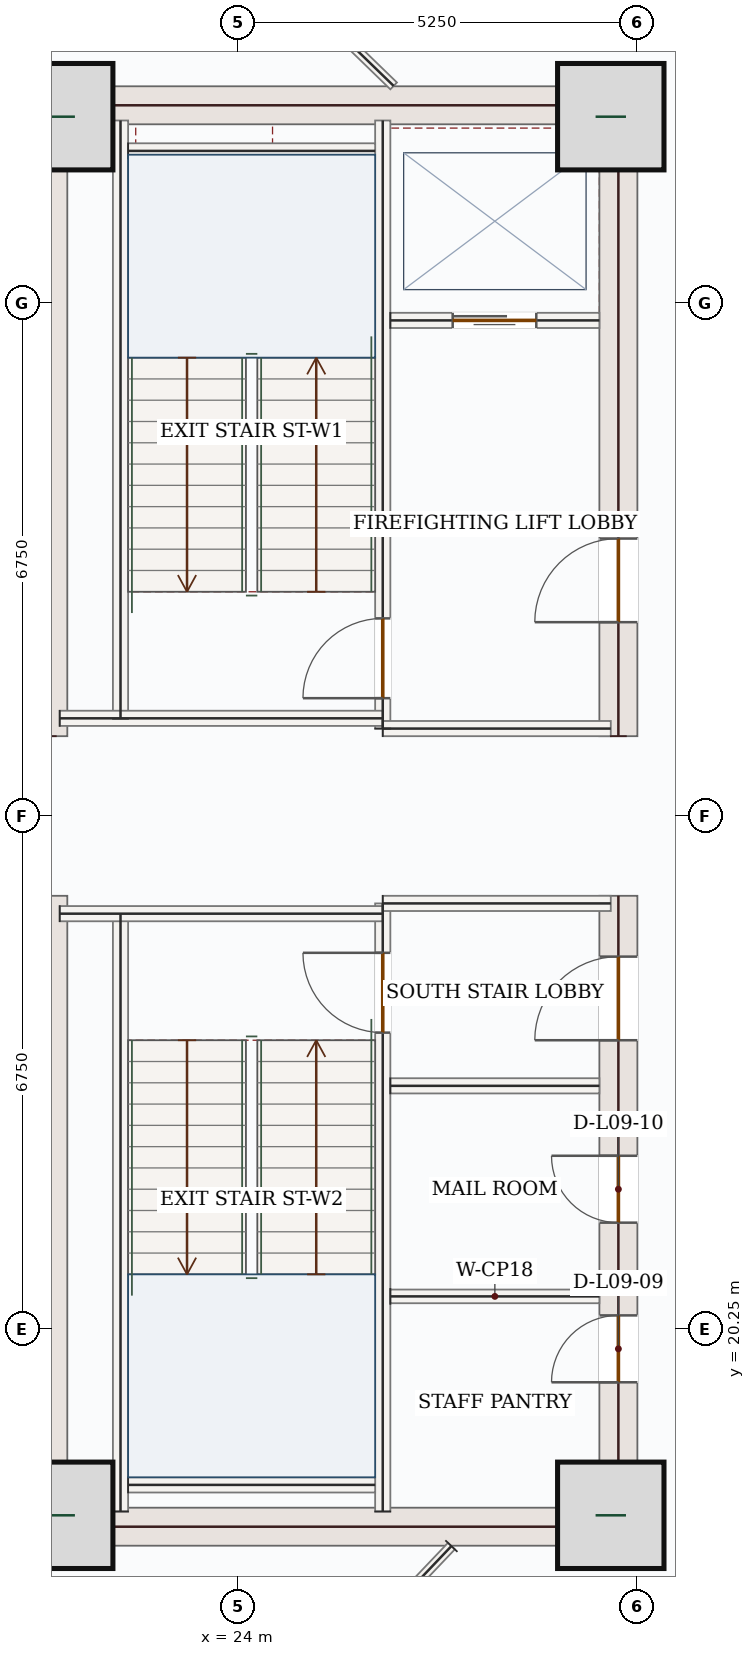
"""IFC4 building model, lengths in metres.
Left out: names, types, materials, properties, quantities, classifications, styles, units other than length and angle.
Written with IfcOpenShell. Run it as: python <this file> out.ifc"""

import sys

from ifc_helpers import new_model, si_unit, direction, frame, frame_2d, origin, origin_2d, place, context, subcontext, project, spatial, rectangle, extrude, source, transform, mapped, element, fill, save


model = new_model("IFC4")
c1 = context("Model", 3, precision=1e-05, world=origin(), true_north=direction((0.0, 1.0)))
c2 = subcontext(c1, "Body", "Model", "MODEL_VIEW")
j1 = project(units=[si_unit("LENGTHUNIT", "METRE"), si_unit("PLANEANGLEUNIT", "RADIAN")], contexts=[c1])
p1 = place(None, origin())
s1 = spatial("IfcSite", under=j1, at=p1, CompositionType="ELEMENT")
p2 = place(p1, origin())
s2 = spatial("IfcBuilding", under=s1, at=p2, CompositionType="ELEMENT")
p3 = place(p2, frame((0.0, 0.0, 45.9)))
s3 = spatial("IfcBuildingStorey", under=s2, at=p3, CompositionType="ELEMENT", Elevation=45.9)
m1 = source(origin(), c2, "Body", "SweptSolid", [
    extrude(rectangle(XDim=8.55, YDim=0.5, at=frame_2d((4.275, 0.0))), origin(), (0.0, 0.0, 1.0), 3.95),
])
for number, where, z_axis, x_axis in (
    (1, (21.5, 17.4, 0.0), (0.0, 0.0, 1.0), (0.0, 1.0, 0.0)),
    (2, (21.5, 28.05, 0.0), (0.0, 0.0, 1.0), (0.0, 1.0, 0.0)),
):
    element("IfcWall", number, at=place(p3, frame(where, z_axis=z_axis, x_axis=x_axis)), inside=s3, PredefinedType="SHEAR", context=c2, shape_type="MappedRepresentation", body=[
        mapped(m1, transform((0.0, 0.0, 0.0), x_axis=(1.0, 0.0, 0.0), y_axis=(0.0, 1.0, 0.0), z_axis=(0.0, 0.0, 1.0), scale=1.0)),
    ])
p4 = place(p3, frame((29.0, 17.4, 0.0), z_axis=(0.0, 0.0, 1.0), x_axis=(0.0, 1.0, 0.0)))
e3 = element("IfcWall", 3, at=p4, inside=s3, PredefinedType="SHEAR", context=c2, shape_type="SweptSolid", body=[
    extrude(rectangle(XDim=8.55, YDim=0.5, at=frame_2d((4.275, 0.0))), origin(), (0.0, 0.0, 1.0), 3.95),
])
p5 = place(p4, frame((6.65, 0.0, 0.0)))
e4 = element("IfcOpeningElement", 4, at=p5, cuts=e3, PredefinedType="OPENING", context=c2, shape_type="SweptSolid", body=[
    extrude(rectangle(XDim=1.1, YDim=2.2, at=frame_2d((0.55, 1.1))), frame((0.0, 0.26, 0.0), z_axis=(0.0, -1.0, 0.0), x_axis=(1.0, 0.0, 0.0)), (0.0, 0.0, 1.0), 0.52),
])
p6 = place(p4, frame((2.15, 0.0, 0.0)))
e5 = element("IfcOpeningElement", 5, at=p6, cuts=e3, PredefinedType="OPENING", context=c2, shape_type="SweptSolid", body=[
    extrude(rectangle(XDim=0.88, YDim=2.1, at=frame_2d((0.44, 1.05))), frame((0.0, 0.26, 0.0), z_axis=(0.0, -1.0, 0.0), x_axis=(1.0, 0.0, 0.0)), (0.0, 0.0, 1.0), 0.52),
])
p7 = place(p4, frame((4.25, 0.0, 0.0)))
e6 = element("IfcOpeningElement", 6, at=p7, cuts=e3, PredefinedType="OPENING", context=c2, shape_type="SweptSolid", body=[
    extrude(rectangle(XDim=0.88, YDim=2.1, at=frame_2d((0.44, 1.05))), frame((0.0, 0.26, 0.0), z_axis=(0.0, -1.0, 0.0), x_axis=(1.0, 0.0, 0.0)), (0.0, 0.0, 1.0), 0.52),
])
p8 = place(p3, frame((29.0, 28.05, 0.0), z_axis=(0.0, 0.0, 1.0), x_axis=(0.0, 1.0, 0.0)))
e7 = element("IfcWall", 7, at=p8, inside=s3, PredefinedType="SHEAR", context=c2, shape_type="SweptSolid", body=[
    extrude(rectangle(XDim=8.55, YDim=0.5, at=frame_2d((4.275, 0.0))), origin(), (0.0, 0.0, 1.0), 3.95),
])
p9 = place(p8, frame((1.5, 0.0, 0.0)))
e8 = element("IfcOpeningElement", 8, at=p9, cuts=e7, PredefinedType="OPENING", context=c2, shape_type="SweptSolid", body=[
    extrude(rectangle(XDim=1.1, YDim=2.2, at=frame_2d((0.55, 1.1))), frame((0.0, 0.26, 0.0), z_axis=(0.0, -1.0, 0.0), x_axis=(1.0, 0.0, 0.0)), (0.0, 0.0, 1.0), 0.52),
])
m2 = source(origin(), c2, "Body", "SweptSolid", [
    extrude(rectangle(XDim=7.0, YDim=0.5, at=frame_2d((3.5, 0.0))), origin(), (0.0, 0.0, 1.0), 3.95),
])
for number, where, z_axis, x_axis in (
    (9, (21.75, 17.65, 0.0), (0.0, 0.0, 1.0), (1.0, 0.0, 0.0)),
    (10, (21.75, 36.35, 0.0), (0.0, 0.0, 1.0), (1.0, 0.0, 0.0)),
):
    element("IfcWall", number, at=place(p3, frame(where, z_axis=z_axis, x_axis=x_axis)), inside=s3, PredefinedType="SHEAR", context=c2, shape_type="MappedRepresentation", body=[
        mapped(m2, transform((0.0, 0.0, 0.0), x_axis=(1.0, 0.0, 0.0), y_axis=(0.0, 1.0, 0.0), z_axis=(0.0, 0.0, 1.0), scale=1.0)),
    ])
m3 = source(origin(), c2, "Body", "SweptSolid", [
    extrude(rectangle(XDim=1.4, YDim=1.4, at=origin_2d()), origin(), (0.0, 0.0, 1.0), 4.2),
])
for number, where, z_axis, x_axis in (
    (11, (21.65, 17.8, 0.0), (0.0, 0.0, 1.0), (1.0, 0.0, 0.0)),
    (12, (28.9, 17.8, 0.0), (0.0, 0.0, 1.0), (1.0, 0.0, 0.0)),
    (13, (21.65, 36.2, 0.0), (0.0, 0.0, 1.0), (1.0, 0.0, 0.0)),
    (14, (28.9, 36.2, 0.0), (0.0, 0.0, 1.0), (1.0, 0.0, 0.0)),
):
    element("IfcColumn", number, at=place(p3, frame(where, z_axis=z_axis, x_axis=x_axis)), inside=s3, PredefinedType="COLUMN", context=c2, shape_type="MappedRepresentation", body=[
        mapped(m3, transform((0.0, 0.0, 0.0), x_axis=(1.0, 0.0, 0.0), y_axis=(0.0, 1.0, 0.0), z_axis=(0.0, 0.0, 1.0), scale=1.0)),
    ])
p10 = place(p3, frame((22.658, 14.74, 0.0), z_axis=(0.0, 0.0, 1.0), x_axis=(-0.707106781187, 0.707106781187, 0.0)))
e15 = element("IfcWall", 15, at=p10, inside=s3, PredefinedType="SOLIDWALL", context=c2, shape_type="SweptSolid", body=[
    extrude(rectangle(XDim=5.258, YDim=0.32, at=frame_2d((2.629, 0.0))), origin(), (0.0, 0.0, 1.0), 3.95),
])
p11 = place(p10, frame((1.429, 0.0, 0.85)))
e16 = element("IfcOpeningElement", 16, at=p11, cuts=e15, PredefinedType="OPENING", context=c2, shape_type="SweptSolid", body=[
    extrude(rectangle(XDim=2.4, YDim=1.8, at=frame_2d((1.2, 0.9))), frame((0.0, 0.17, 0.0), z_axis=(0.0, -1.0, 0.0), x_axis=(1.0, 0.0, 0.0)), (0.0, 0.0, 1.0), 0.34),
])
m4 = source(origin(), c2, "Body", "SweptSolid", [
    extrude(rectangle(XDim=5.258, YDim=0.32, at=frame_2d((2.629, 0.0))), origin(), (0.0, 0.0, 1.0), 3.95),
])
p12 = place(p3, frame((18.94, 35.542, 0.0), z_axis=(0.0, 0.0, 1.0), x_axis=(0.707106781187, 0.707106781187, 0.0)))
e17 = element("IfcWall", 17, at=p12, inside=s3, PredefinedType="SOLIDWALL", context=c2, shape_type="MappedRepresentation", body=[
    mapped(m4, transform((0.0, 0.0, 0.0), x_axis=(1.0, 0.0, 0.0), y_axis=(0.0, 1.0, 0.0), z_axis=(0.0, 0.0, 1.0), scale=1.0)),
])
m5 = source(origin(), c2, "Body", "SweptSolid", [
    extrude(rectangle(XDim=7.87, YDim=0.2, at=frame_2d((3.935, 0.0))), origin(), (0.0, 0.0, 1.0), 3.95),
])
for number, where, z_axis, x_axis in (
    (18, (22.45, 17.85, 0.0), (0.0, 0.0, 1.0), (0.0, 1.0, 0.0)),
    (19, (22.45, 28.28, 0.0), (0.0, 0.0, 1.0), (0.0, 1.0, 0.0)),
):
    element("IfcWall", number, at=place(p3, frame(where, z_axis=z_axis, x_axis=x_axis)), inside=s3, PredefinedType="SOLIDWALL", context=c2, shape_type="MappedRepresentation", body=[
        mapped(m5, transform((0.0, 0.0, 0.0), x_axis=(1.0, 0.0, 0.0), y_axis=(0.0, 1.0, 0.0), z_axis=(0.0, 0.0, 1.0), scale=1.0)),
    ])
p13 = place(p3, frame((25.9, 17.85, 0.0), z_axis=(0.0, 0.0, 1.0), x_axis=(0.0, 1.0, 0.0)))
e20 = element("IfcWall", 20, at=p13, inside=s3, PredefinedType="SOLIDWALL", context=c2, shape_type="SweptSolid", body=[
    extrude(rectangle(XDim=8.0, YDim=0.2, at=frame_2d((4.0, 0.0))), origin(), (0.0, 0.0, 1.0), 3.95),
])
p14 = place(p13, frame((6.3, 0.0, 0.0)))
e21 = element("IfcOpeningElement", 21, at=p14, cuts=e20, PredefinedType="OPENING", context=c2, shape_type="SweptSolid", body=[
    extrude(rectangle(XDim=1.05, YDim=2.15, at=frame_2d((0.525, 1.075))), frame((0.0, 0.11, 0.0), z_axis=(0.0, -1.0, 0.0), x_axis=(1.0, 0.0, 0.0)), (0.0, 0.0, 1.0), 0.22),
])
p15 = place(p3, frame((25.9, 28.15, 0.0), z_axis=(0.0, 0.0, 1.0), x_axis=(0.0, 1.0, 0.0)))
e22 = element("IfcWall", 22, at=p15, inside=s3, PredefinedType="SOLIDWALL", context=c2, shape_type="SweptSolid", body=[
    extrude(rectangle(XDim=8.0, YDim=0.2, at=frame_2d((4.0, 0.0))), origin(), (0.0, 0.0, 1.0), 3.95),
])
p16 = place(p15, frame((0.4, 0.0, 0.0)))
e23 = element("IfcOpeningElement", 23, at=p16, cuts=e22, PredefinedType="OPENING", context=c2, shape_type="SweptSolid", body=[
    extrude(rectangle(XDim=1.05, YDim=2.15, at=frame_2d((0.525, 1.075))), frame((0.0, 0.11, 0.0), z_axis=(0.0, -1.0, 0.0), x_axis=(1.0, 0.0, 0.0)), (0.0, 0.0, 1.0), 0.22),
])
m6 = source(origin(), c2, "Body", "SweptSolid", [
    extrude(rectangle(XDim=4.25, YDim=0.2, at=frame_2d((2.125, 0.0))), origin(), (0.0, 0.0, 1.0), 3.95),
])
p17 = place(p3, frame((21.65, 25.715, 0.0), z_axis=(0.0, 0.0, 1.0), x_axis=(1.0, 0.0, 0.0)))
e24 = element("IfcWall", 24, at=p17, inside=s3, PredefinedType="SOLIDWALL", context=c2, shape_type="MappedRepresentation", body=[
    mapped(m6, transform((0.0, 0.0, 0.0), x_axis=(1.0, 0.0, 0.0), y_axis=(0.0, 1.0, 0.0), z_axis=(0.0, 0.0, 1.0), scale=1.0)),
])
m7 = source(origin(), c2, "Body", "SweptSolid", [
    extrude(rectangle(XDim=3.0, YDim=0.2, at=frame_2d((1.5, 0.0))), origin(), (0.0, 0.0, 1.0), 3.95),
])
p18 = place(p3, frame((25.9, 25.85, 0.0), z_axis=(0.0, 0.0, 1.0), x_axis=(1.0, 0.0, 0.0)))
e25 = element("IfcWall", 25, at=p18, inside=s3, PredefinedType="SOLIDWALL", context=c2, shape_type="MappedRepresentation", body=[
    mapped(m7, transform((0.0, 0.0, 0.0), x_axis=(1.0, 0.0, 0.0), y_axis=(0.0, 1.0, 0.0), z_axis=(0.0, 0.0, 1.0), scale=1.0)),
])
p19 = place(p3, frame((21.65, 28.285, 0.0), z_axis=(0.0, 0.0, 1.0), x_axis=(1.0, 0.0, 0.0)))
e26 = element("IfcWall", 26, at=p19, inside=s3, PredefinedType="SOLIDWALL", context=c2, shape_type="MappedRepresentation", body=[
    mapped(m6, transform((0.0, 0.0, 0.0), x_axis=(1.0, 0.0, 0.0), y_axis=(0.0, 1.0, 0.0), z_axis=(0.0, 0.0, 1.0), scale=1.0)),
])
p20 = place(p3, frame((25.9, 28.15, 0.0), z_axis=(0.0, 0.0, 1.0), x_axis=(1.0, 0.0, 0.0)))
e27 = element("IfcWall", 27, at=p20, inside=s3, PredefinedType="SOLIDWALL", context=c2, shape_type="MappedRepresentation", body=[
    mapped(m7, transform((0.0, 0.0, 0.0), x_axis=(1.0, 0.0, 0.0), y_axis=(0.0, 1.0, 0.0), z_axis=(0.0, 0.0, 1.0), scale=1.0)),
])
m8 = source(origin(), c2, "Body", "SweptSolid", [
    extrude(rectangle(XDim=3.25, YDim=0.2, at=frame_2d((1.625, 0.0))), origin(), (0.0, 0.0, 1.0), 3.95),
])
for number, where, z_axis, x_axis in (
    (28, (22.55, 35.75, 0.0), (0.0, 0.0, 1.0), (1.0, 0.0, 0.0)),
    (29, (22.55, 18.2, 0.0), (0.0, 0.0, 1.0), (1.0, 0.0, 0.0)),
):
    element("IfcWall", number, at=place(p3, frame(where, z_axis=z_axis, x_axis=x_axis)), inside=s3, PredefinedType="SOLIDWALL", context=c2, shape_type="MappedRepresentation", body=[
        mapped(m8, transform((0.0, 0.0, 0.0), x_axis=(1.0, 0.0, 0.0), y_axis=(0.0, 1.0, 0.0), z_axis=(0.0, 0.0, 1.0), scale=1.0)),
    ])
p21 = place(p3, frame((26.0, 33.52, 0.0), z_axis=(0.0, 0.0, 1.0), x_axis=(1.0, 0.0, 0.0)))
e30 = element("IfcWall", 30, at=p21, inside=s3, PredefinedType="SOLIDWALL", context=c2, shape_type="SweptSolid", body=[
    extrude(rectangle(XDim=2.75, YDim=0.2, at=frame_2d((1.375, 0.0))), origin(), (0.0, 0.0, 1.0), 3.95),
])
p22 = place(p21, frame((0.82, 0.0, 0.0)))
e31 = element("IfcOpeningElement", 31, at=p22, cuts=e30, PredefinedType="OPENING", context=c2, shape_type="SweptSolid", body=[
    extrude(rectangle(XDim=1.1, YDim=2.15, at=frame_2d((0.55, 1.075))), frame((0.0, 0.11, 0.0), z_axis=(0.0, -1.0, 0.0), x_axis=(1.0, 0.0, 0.0)), (0.0, 0.0, 1.0), 0.22),
])
m9 = source(origin(), c2, "Body", "SweptSolid", [
    extrude(rectangle(XDim=2.75, YDim=0.2, at=frame_2d((1.375, 0.0))), origin(), (0.0, 0.0, 1.0), 3.95),
])
p23 = place(p3, frame((26.0, 23.45, 0.0), z_axis=(0.0, 0.0, 1.0), x_axis=(1.0, 0.0, 0.0)))
e32 = element("IfcWall", 32, at=p23, inside=s3, PredefinedType="SOLIDWALL", context=c2, shape_type="MappedRepresentation", body=[
    mapped(m9, transform((0.0, 0.0, 0.0), x_axis=(1.0, 0.0, 0.0), y_axis=(0.0, 1.0, 0.0), z_axis=(0.0, 0.0, 1.0), scale=1.0)),
])
m10 = source(origin(), c2, "Body", "SweptSolid", [
    extrude(rectangle(XDim=2.75, YDim=0.18, at=frame_2d((1.375, 0.0))), origin(), (0.0, 0.0, 1.0), 3.95),
])
p24 = place(p3, frame((26.0, 20.68, 0.0), z_axis=(0.0, 0.0, 1.0), x_axis=(1.0, 0.0, 0.0)))
e33 = element("IfcWall", 33, at=p24, inside=s3, PredefinedType="PARTITIONING", context=c2, shape_type="MappedRepresentation", body=[
    mapped(m10, transform((0.0, 0.0, 0.0), x_axis=(1.0, 0.0, 0.0), y_axis=(0.0, 1.0, 0.0), z_axis=(0.0, 0.0, 1.0), scale=1.0)),
])
m11 = source(origin(), c2, "Body", "SweptSolid", [
    extrude(rectangle(XDim=1.771, YDim=0.125, at=frame_2d((0.885, 0.0))), origin(), (0.0, 0.0, 1.0), 3.95),
])
p25 = place(p3, frame((24.772, 37.838, 0.0), z_axis=(0.0, 0.0, 1.0), x_axis=(0.717777212316, -0.696272844135, 0.0)))
e34 = element("IfcWall", 34, at=p25, inside=s3, PredefinedType="PARTITIONING", context=c2, shape_type="MappedRepresentation", body=[
    mapped(m11, transform((0.0, 0.0, 0.0), x_axis=(1.0, 0.0, 0.0), y_axis=(0.0, 1.0, 0.0), z_axis=(0.0, 0.0, 1.0), scale=1.0)),
])
m12 = source(origin(), c2, "Body", "SweptSolid", [
    extrude(rectangle(XDim=3.438, YDim=0.125, at=frame_2d((1.719, 0.0))), origin(), (0.0, 0.0, 1.0), 3.95),
])
p26 = place(p3, frame((26.803, 17.395, 0.0), z_axis=(0.0, 0.0, 1.0), x_axis=(-0.689493786127, -0.724291597972, 0.0)))
e35 = element("IfcWall", 35, at=p26, inside=s3, PredefinedType="PARTITIONING", context=c2, shape_type="MappedRepresentation", body=[
    mapped(m12, transform((0.0, 0.0, 0.0), x_axis=(1.0, 0.0, 0.0), y_axis=(0.0, 1.0, 0.0), z_axis=(0.0, 0.0, 1.0), scale=1.0)),
])
m13 = source(origin(), c2, "Body", "SweptSolid", [
    extrude(rectangle(XDim=2.4, YDim=1.8, at=frame_2d((1.2, 0.9))), frame((0.0, 0.03, 0.0), z_axis=(0.0, -1.0, 0.0), x_axis=(1.0, 0.0, 0.0)), (0.0, 0.0, 1.0), 0.06),
])
p27 = place(p11, origin())
e36 = element("IfcWindow", 36, at=p27, inside=s3, PartitioningType="DOUBLE_PANEL_VERTICAL", PredefinedType="WINDOW", context=c2, shape_type="MappedRepresentation", body=[
    mapped(m13, transform((0.0, 0.0, 0.0), x_axis=(1.0, 0.0, 0.0), y_axis=(0.0, 1.0, 0.0), z_axis=(0.0, 0.0, 1.0), scale=1.0)),
])
fill(e16, e36)
m14 = source(origin(), c2, "Body", "SweptSolid", [
    extrude(rectangle(XDim=1.05, YDim=2.15, at=frame_2d((0.525, 1.075))), frame((0.0, 0.025, 0.0), z_axis=(0.0, -1.0, 0.0), x_axis=(1.0, 0.0, 0.0)), (0.0, 0.0, 1.0), 0.05),
])
p28 = place(p16, origin())
e37 = element("IfcDoor", 37, at=p28, inside=s3, OperationType="SINGLE_SWING_LEFT", PredefinedType="DOOR", context=c2, shape_type="MappedRepresentation", body=[
    mapped(m14, transform((0.0, 0.0, 0.0), x_axis=(1.0, 0.0, 0.0), y_axis=(0.0, 1.0, 0.0), z_axis=(0.0, 0.0, 1.0), scale=1.0)),
])
fill(e23, e37)
p29 = place(p14, origin())
e38 = element("IfcDoor", 38, at=p29, inside=s3, OperationType="SINGLE_SWING_RIGHT", PredefinedType="DOOR", context=c2, shape_type="MappedRepresentation", body=[
    mapped(m14, transform((0.0, 0.0, 0.0), x_axis=(1.0, 0.0, 0.0), y_axis=(0.0, 1.0, 0.0), z_axis=(0.0, 0.0, 1.0), scale=1.0)),
])
fill(e21, e38)
m15 = source(origin(), c2, "Body", "SweptSolid", [
    extrude(rectangle(XDim=1.1, YDim=2.15, at=frame_2d((0.55, 1.075))), frame((0.0, 0.025, 0.0), z_axis=(0.0, -1.0, 0.0), x_axis=(1.0, 0.0, 0.0)), (0.0, 0.0, 1.0), 0.05),
])
p30 = place(p22, origin())
e39 = element("IfcDoor", 39, at=p30, inside=s3, OperationType="DOUBLE_DOOR_SLIDING", PredefinedType="DOOR", context=c2, shape_type="MappedRepresentation", body=[
    mapped(m15, transform((0.0, 0.0, 0.0), x_axis=(1.0, 0.0, 0.0), y_axis=(0.0, 1.0, 0.0), z_axis=(0.0, 0.0, 1.0), scale=1.0)),
])
fill(e31, e39)
m16 = source(origin(), c2, "Body", "SweptSolid", [
    extrude(rectangle(XDim=1.1, YDim=2.2, at=frame_2d((0.55, 1.1))), frame((0.0, 0.025, 0.0), z_axis=(0.0, -1.0, 0.0), x_axis=(1.0, 0.0, 0.0)), (0.0, 0.0, 1.0), 0.05),
])
p31 = place(p9, origin())
e40 = element("IfcDoor", 40, at=p31, inside=s3, OperationType="SINGLE_SWING_LEFT", PredefinedType="DOOR", context=c2, shape_type="MappedRepresentation", body=[
    mapped(m16, transform((0.0, 0.0, 0.0), x_axis=(1.0, 0.0, 0.0), y_axis=(0.0, 1.0, 0.0), z_axis=(0.0, 0.0, 1.0), scale=1.0)),
])
fill(e8, e40)
p32 = place(p5, origin())
e41 = element("IfcDoor", 41, at=p32, inside=s3, OperationType="SINGLE_SWING_LEFT", PredefinedType="DOOR", context=c2, shape_type="MappedRepresentation", body=[
    mapped(m16, transform((0.0, 0.0, 0.0), x_axis=(1.0, 0.0, 0.0), y_axis=(0.0, 1.0, 0.0), z_axis=(0.0, 0.0, 1.0), scale=1.0)),
])
fill(e4, e41)
m17 = source(origin(), c2, "Body", "SweptSolid", [
    extrude(rectangle(XDim=0.88, YDim=2.1, at=frame_2d((0.44, 1.05))), frame((0.0, 0.025, 0.0), z_axis=(0.0, -1.0, 0.0), x_axis=(1.0, 0.0, 0.0)), (0.0, 0.0, 1.0), 0.05),
])
p33 = place(p6, origin())
e42 = element("IfcDoor", 42, at=p33, inside=s3, OperationType="SINGLE_SWING_LEFT", PredefinedType="DOOR", context=c2, shape_type="MappedRepresentation", body=[
    mapped(m17, transform((0.0, 0.0, 0.0), x_axis=(1.0, 0.0, 0.0), y_axis=(0.0, 1.0, 0.0), z_axis=(0.0, 0.0, 1.0), scale=1.0)),
])
fill(e5, e42)
p34 = place(p7, origin())
e43 = element("IfcDoor", 43, at=p34, inside=s3, OperationType="SINGLE_SWING_RIGHT", PredefinedType="DOOR", context=c2, shape_type="MappedRepresentation", body=[
    mapped(m17, transform((0.0, 0.0, 0.0), x_axis=(1.0, 0.0, 0.0), y_axis=(0.0, 1.0, 0.0), z_axis=(0.0, 0.0, 1.0), scale=1.0)),
])
fill(e6, e43)
save(model, sys.argv[1])
